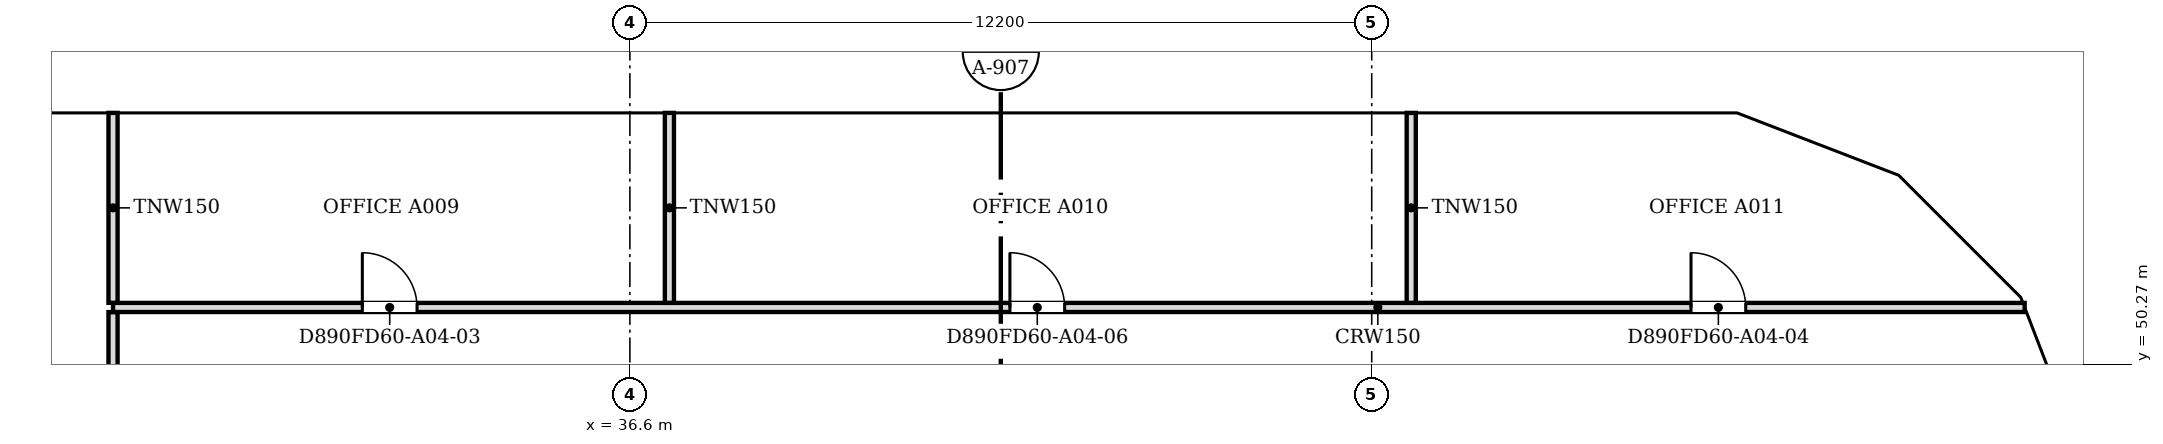
"""IFC4 building model, lengths in metres.
Left out: names, types, materials, properties, quantities, classifications, styles, units other than length and angle.
Written with IfcOpenShell. Run it as: python <this file> out.ifc"""

import sys

from ifc_helpers import new_model, si_unit, direction, frame, frame_2d, origin, place, context, subcontext, project, spatial, polyline, rectangle, outline, extrude, faceted_brep, source, transform, mapped, element, fill, save


model = new_model("IFC4")
c1 = context("Model", 3, precision=1e-05, world=origin(), true_north=direction((0.0, 1.0)))
c2 = subcontext(c1, "Body", "Model", "MODEL_VIEW")
j1 = project(units=[si_unit("LENGTHUNIT", "METRE"), si_unit("PLANEANGLEUNIT", "RADIAN")], contexts=[c1])
p1 = place(None, origin())
s1 = spatial("IfcSite", under=j1, at=p1, CompositionType="ELEMENT")
p2 = place(p1, origin())
s2 = spatial("IfcBuilding", under=s1, at=p2, CompositionType="ELEMENT")
p3 = place(p2, frame((0.0, 0.0, 48.6)))
s3 = spatial("IfcBuildingStorey", under=s2, at=p3, CompositionType="ELEMENT", Elevation=48.6)
m1 = source(origin(), c2, "Body", "Brep", [
    faceted_brep([(2.95, -0.25, 0.0), (3.003, -0.25, 0.068), (3.003, -0.25, 7.531), (2.95, -0.25, 7.6), (0.0, -0.25, 3.8), (0.047, 0.25, 3.86), (2.898, 0.25, 7.532), (2.898, 0.25, 0.068), (0.047, 0.25, 3.74), (2.95, 0.0, 0.0), (2.95, 0.0, 7.6), (0.0, 0.0, 3.8)], [[[0, 1, 2, 3, 4]], [[5, 6, 7, 8]], [[1, 0, 9]], [[10, 3, 2]], [[6, 5, 11, 4, 3, 10]], [[8, 7, 9, 0, 4, 11]], [[8, 11, 5]], [[1, 9, 7, 6, 10, 2]]]),
])
p4 = place(p3, frame((60.75, 48.753, -3.8), z_axis=(0.0, 0.0, 1.0), x_axis=(-0.35992665181, 0.932980602862, 0.0)))
e1 = element("IfcWall", 1, at=p4, inside=s3, PredefinedType="SOLIDWALL", context=c2, shape_type="MappedRepresentation", body=[
    mapped(m1, transform((0.0, 0.0, 0.0), scale=1.0)),
])
m2 = source(origin(), c2, "Body", "SweptSolid", [
    extrude(outline(polyline([(2.75, 6.935), (0.316, 3.8), (2.75, 0.665), (2.75, 6.935)])), frame((0.0, 0.26, 0.0), z_axis=(0.0, -1.0, 0.0), x_axis=(1.0, 0.0, 0.0)), (0.0, 0.0, 1.0), 0.52),
])
p5 = place(p4, origin())
e2 = element("IfcOpeningElement", 2, at=p5, cuts=e1, PredefinedType="OPENING", context=c2, shape_type="MappedRepresentation", body=[
    mapped(m2, transform((0.0, 0.0, 0.0), scale=1.0)),
])
m3 = source(origin(), c2, "Body", "Brep", [
    faceted_brep([(0.053, -0.25, 0.0), (2.997, -0.25, 3.8), (0.053, -0.25, 7.6), (0.0, -0.25, 7.532), (0.0, -0.25, 0.068), (0.106, 0.25, 7.531), (2.944, 0.25, 3.868), (2.944, 0.25, 3.732), (0.106, 0.25, 0.068), (2.997, 0.0, 3.8), (0.053, 0.0, 0.0), (0.053, 0.0, 7.6)], [[[0, 1, 2, 3, 4]], [[5, 6, 7, 8]], [[8, 7, 9, 1, 0, 10]], [[6, 5, 11, 2, 1, 9]], [[3, 2, 11]], [[10, 0, 4]], [[8, 10, 4, 3, 11, 5]], [[7, 6, 9]]]),
])
p6 = place(p3, frame((59.726, 51.469, -3.8), z_axis=(0.0, 0.0, 1.0), x_axis=(-0.707106781187, 0.707106781187, 0.0)))
e3 = element("IfcWall", 3, at=p6, inside=s3, PredefinedType="SOLIDWALL", context=c2, shape_type="MappedRepresentation", body=[
    mapped(m3, transform((0.0, 0.0, 0.0), scale=1.0)),
])
m4 = source(origin(), c2, "Body", "SweptSolid", [
    extrude(outline(polyline([(0.253, 0.666), (2.681, 3.8), (0.253, 6.934), (0.253, 0.666)])), frame((0.0, 0.26, 0.0), z_axis=(0.0, -1.0, 0.0), x_axis=(1.0, 0.0, 0.0)), (0.0, 0.0, 1.0), 0.52),
])
p7 = place(p6, origin())
e4 = element("IfcOpeningElement", 4, at=p7, cuts=e3, PredefinedType="OPENING", context=c2, shape_type="MappedRepresentation", body=[
    mapped(m4, transform((0.0, 0.0, 0.0), scale=1.0)),
])
m5 = source(origin(), c2, "Body", "Brep", [
    faceted_brep([(2.95, -0.25, 0.0), (2.997, -0.25, 0.059), (2.997, -0.25, 7.541), (2.95, -0.25, 7.6), (0.0, -0.25, 3.8), (0.053, 0.25, 3.868), (2.904, 0.25, 7.54), (2.904, 0.25, 0.06), (0.053, 0.25, 3.732), (2.95, 0.0, 0.0), (2.95, 0.0, 7.6), (0.0, 0.0, 3.8)], [[[0, 1, 2, 3, 4]], [[5, 6, 7, 8]], [[1, 0, 9]], [[10, 3, 2]], [[6, 5, 11, 4, 3, 10]], [[8, 7, 9, 0, 4, 11]], [[8, 11, 5]], [[1, 9, 7, 6, 10, 2]]]),
])
p8 = place(p3, frame((57.606, 53.588, -3.8), z_axis=(0.0, 0.0, 1.0), x_axis=(-0.932990326376, 0.359901446078, 0.0)))
e5 = element("IfcWall", 5, at=p8, inside=s3, PredefinedType="SOLIDWALL", context=c2, shape_type="MappedRepresentation", body=[
    mapped(m5, transform((0.0, 0.0, 0.0), scale=1.0)),
])
p9 = place(p8, origin())
e6 = element("IfcOpeningElement", 6, at=p9, cuts=e5, PredefinedType="OPENING", context=c2, shape_type="MappedRepresentation", body=[
    mapped(m2, transform((0.0, 0.0, 0.0), scale=1.0)),
])
m6 = source(origin(), c2, "Body", "Brep", [
    faceted_brep([(0.047, -0.25, 0.0), (3.05, -0.25, 3.8), (0.047, -0.25, 7.6), (0.0, -0.25, 7.54), (0.0, -0.25, 0.06), (0.093, 0.25, 7.541), (3.05, 0.25, 3.8), (0.093, 0.25, 0.059), (0.047, 0.0, 0.0), (0.047, 0.0, 7.6)], [[[0, 1, 2, 3, 4]], [[5, 6, 7]], [[7, 6, 1, 0, 8]], [[6, 5, 9, 2, 1]], [[3, 2, 9]], [[8, 0, 4]], [[7, 8, 4, 3, 9, 5]]]),
])
p10 = place(p3, frame((54.9, 54.65, -3.8), z_axis=(0.0, 0.0, 1.0), x_axis=(-1.0, 0.0, 0.0)))
e7 = element("IfcWall", 7, at=p10, inside=s3, PredefinedType="SOLIDWALL", context=c2, shape_type="MappedRepresentation", body=[
    mapped(m6, transform((0.0, 0.0, 0.0), scale=1.0)),
])
m7 = source(origin(), c2, "Body", "SweptSolid", [
    extrude(outline(polyline([(0.247, 0.656), (2.731, 3.8), (0.247, 6.944), (0.247, 0.656)])), frame((0.0, 0.26, 0.0), z_axis=(0.0, -1.0, 0.0), x_axis=(1.0, 0.0, 0.0)), (0.0, 0.0, 1.0), 0.52),
])
p11 = place(p10, origin())
e8 = element("IfcOpeningElement", 8, at=p11, cuts=e7, PredefinedType="OPENING", context=c2, shape_type="MappedRepresentation", body=[
    mapped(m7, transform((0.0, 0.0, 0.0), scale=1.0)),
])
m8 = source(origin(), c2, "Body", "SweptSolid", [
    extrude(outline(polyline([(3.05, 0.0), (6.1, 3.8), (3.05, 7.6), (0.0, 3.8), (3.05, 0.0)])), frame((0.0, 0.25, 0.0), z_axis=(0.0, -1.0, 0.0), x_axis=(1.0, 0.0, 0.0)), (0.0, 0.0, 1.0), 0.5),
])
p12 = place(p3, frame((51.85, 54.65, -3.8), z_axis=(0.0, 0.0, 1.0), x_axis=(-1.0, 0.0, 0.0)))
e9 = element("IfcWall", 9, at=p12, inside=s3, PredefinedType="SOLIDWALL", context=c2, shape_type="MappedRepresentation", body=[
    mapped(m8, transform((0.0, 0.0, 0.0), scale=1.0)),
])
m9 = source(origin(), c2, "Body", "SweptSolid", [
    extrude(outline(polyline([(3.05, 0.399), (5.78, 3.8), (3.05, 7.2), (0.321, 3.8), (3.05, 0.399)])), frame((0.0, 0.26, 0.0), z_axis=(0.0, -1.0, 0.0), x_axis=(1.0, 0.0, 0.0)), (0.0, 0.0, 1.0), 0.52),
])
p13 = place(p12, origin())
e10 = element("IfcOpeningElement", 10, at=p13, cuts=e9, PredefinedType="OPENING", context=c2, shape_type="MappedRepresentation", body=[
    mapped(m9, transform((0.0, 0.0, 0.0), scale=1.0)),
])
p14 = place(p3, frame((45.75, 54.65, -3.8), z_axis=(0.0, 0.0, 1.0), x_axis=(-1.0, 0.0, 0.0)))
e11 = element("IfcWall", 11, at=p14, inside=s3, PredefinedType="SOLIDWALL", context=c2, shape_type="MappedRepresentation", body=[
    mapped(m8, transform((0.0, 0.0, 0.0), scale=1.0)),
])
p15 = place(p14, origin())
e12 = element("IfcOpeningElement", 12, at=p15, cuts=e11, PredefinedType="OPENING", context=c2, shape_type="MappedRepresentation", body=[
    mapped(m9, transform((0.0, 0.0, 0.0), scale=1.0)),
])
m10 = source(origin(), c2, "Body", "Brep", [
    faceted_brep([(3.05, -0.25, 0.0), (6.1, -0.25, 3.8), (6.1, -0.25, 3.8), (3.05, -0.25, 7.6), (0.0, -0.25, 3.8), (0.0, 0.25, 3.8), (3.05, 0.25, 7.6), (6.1, 0.25, 3.8), (6.1, 0.25, 3.8), (3.05, 0.25, 0.0)], [[[0, 1, 2, 3, 4]], [[5, 6, 7, 8, 9]], [[9, 8, 1, 0]], [[7, 6, 3, 2]], [[6, 5, 4, 3]], [[5, 9, 0, 4]], [[1, 8, 7, 2]]]),
])
p16 = place(p3, frame((39.65, 54.65, -3.8), z_axis=(0.0, 0.0, 1.0), x_axis=(-1.0, 0.0, 0.0)))
e13 = element("IfcWall", 13, at=p16, inside=s3, PredefinedType="SOLIDWALL", context=c2, shape_type="MappedRepresentation", body=[
    mapped(m10, transform((0.0, 0.0, 0.0), scale=1.0)),
])
p17 = place(p16, origin())
e14 = element("IfcOpeningElement", 14, at=p17, cuts=e13, PredefinedType="OPENING", context=c2, shape_type="MappedRepresentation", body=[
    mapped(m9, transform((0.0, 0.0, 0.0), scale=1.0)),
])
p18 = place(p3, frame((33.55, 54.65, -3.8), z_axis=(0.0, 0.0, 1.0), x_axis=(-1.0, 0.0, 0.0)))
e15 = element("IfcWall", 15, at=p18, inside=s3, PredefinedType="SOLIDWALL", context=c2, shape_type="MappedRepresentation", body=[
    mapped(m8, transform((0.0, 0.0, 0.0), scale=1.0)),
])
p19 = place(p18, origin())
e16 = element("IfcOpeningElement", 16, at=p19, cuts=e15, PredefinedType="OPENING", context=c2, shape_type="MappedRepresentation", body=[
    mapped(m9, transform((0.0, 0.0, 0.0), scale=1.0)),
])
p20 = place(p3, frame((27.45, 54.65, -3.8), z_axis=(0.0, 0.0, 1.0), x_axis=(-1.0, 0.0, 0.0)))
e17 = element("IfcWall", 17, at=p20, inside=s3, PredefinedType="SOLIDWALL", context=c2, shape_type="MappedRepresentation", body=[
    mapped(m10, transform((0.0, 0.0, 0.0), scale=1.0)),
])
p21 = place(p20, origin())
e18 = element("IfcOpeningElement", 18, at=p21, cuts=e17, PredefinedType="OPENING", context=c2, shape_type="MappedRepresentation", body=[
    mapped(m9, transform((0.0, 0.0, 0.0), scale=1.0)),
])
p22 = place(p2, frame((0.0, 0.0, 52.4)))
s4 = spatial("IfcBuildingStorey", under=s2, at=p22, CompositionType="ELEMENT", Elevation=52.4)
m11 = source(origin(), c2, "Body", "Brep", [
    faceted_brep([(0.047, -0.25, 0.0), (2.997, -0.25, 3.8), (0.047, -0.25, 7.6), (0.0, -0.25, 7.541), (0.0, -0.25, 0.059), (0.093, 0.25, 7.54), (2.944, 0.25, 3.868), (2.944, 0.25, 3.732), (0.093, 0.25, 0.06), (2.997, 0.0, 3.8), (0.047, 0.0, 0.0), (0.047, 0.0, 7.6)], [[[0, 1, 2, 3, 4]], [[5, 6, 7, 8]], [[8, 7, 9, 1, 0, 10]], [[6, 5, 11, 2, 1, 9]], [[3, 2, 11]], [[10, 0, 4]], [[8, 10, 4, 3, 11, 5]], [[9, 7, 6]]]),
])
p23 = place(p22, frame((60.767, 48.71, -3.8), z_axis=(0.0, 0.0, 1.0), x_axis=(-0.359901446078, 0.932990326376, 0.0)))
e19 = element("IfcWall", 19, at=p23, inside=s4, PredefinedType="SOLIDWALL", context=c2, shape_type="MappedRepresentation", body=[
    mapped(m11, transform((0.0, 0.0, 0.0), scale=1.0)),
])
m12 = source(origin(), c2, "Body", "SweptSolid", [
    extrude(outline(polyline([(0.247, 0.665), (2.681, 3.8), (0.247, 6.935), (0.247, 0.665)])), frame((0.0, 0.26, 0.0), z_axis=(0.0, -1.0, 0.0), x_axis=(1.0, 0.0, 0.0)), (0.0, 0.0, 1.0), 0.52),
])
p24 = place(p23, origin())
e20 = element("IfcOpeningElement", 20, at=p24, cuts=e19, PredefinedType="OPENING", context=c2, shape_type="MappedRepresentation", body=[
    mapped(m12, transform((0.0, 0.0, 0.0), scale=1.0)),
])
m13 = source(origin(), c2, "Body", "Brep", [
    faceted_brep([(2.944, -0.25, 0.0), (2.997, -0.25, 0.068), (2.997, -0.25, 7.532), (2.944, -0.25, 7.6), (0.0, -0.25, 3.8), (0.053, 0.25, 3.868), (2.891, 0.25, 7.532), (2.891, 0.25, 0.068), (0.053, 0.25, 3.731), (2.944, 0.0, 0.0), (2.944, 0.0, 7.6), (0.0, 0.0, 3.8)], [[[0, 1, 2, 3, 4]], [[5, 6, 7, 8]], [[1, 0, 9]], [[10, 3, 2]], [[6, 5, 11, 4, 3, 10]], [[8, 7, 9, 0, 4, 11]], [[8, 11, 5]], [[1, 9, 7, 6, 10, 2]]]),
])
p25 = place(p22, frame((59.688, 51.506, -3.8), z_axis=(0.0, 0.0, 1.0), x_axis=(-0.707106781187, 0.707106781187, 0.0)))
e21 = element("IfcWall", 21, at=p25, inside=s4, PredefinedType="SOLIDWALL", context=c2, shape_type="MappedRepresentation", body=[
    mapped(m13, transform((0.0, 0.0, 0.0), scale=1.0)),
])
m14 = source(origin(), c2, "Body", "SweptSolid", [
    extrude(outline(polyline([(2.744, 6.934), (0.316, 3.8), (2.744, 0.666), (2.744, 6.934)])), frame((0.0, 0.26, 0.0), z_axis=(0.0, -1.0, 0.0), x_axis=(1.0, 0.0, 0.0)), (0.0, 0.0, 1.0), 0.52),
])
p26 = place(p25, origin())
e22 = element("IfcOpeningElement", 22, at=p26, cuts=e21, PredefinedType="OPENING", context=c2, shape_type="MappedRepresentation", body=[
    mapped(m14, transform((0.0, 0.0, 0.0), scale=1.0)),
])
m15 = source(origin(), c2, "Body", "Brep", [
    faceted_brep([(0.053, -0.25, 0.0), (3.003, -0.25, 3.8), (0.053, -0.25, 7.6), (0.0, -0.25, 7.531), (0.0, -0.25, 0.068), (0.106, 0.25, 7.532), (2.957, 0.25, 3.86), (2.957, 0.25, 3.74), (0.106, 0.25, 0.068), (3.003, 0.0, 3.8), (0.053, 0.0, 0.0), (0.053, 0.0, 7.6)], [[[0, 1, 2, 3, 4]], [[5, 6, 7, 8]], [[8, 7, 9, 1, 0, 10]], [[6, 5, 11, 2, 1, 9]], [[3, 2, 11]], [[10, 0, 4]], [[8, 10, 4, 3, 11, 5]], [[9, 7, 6]]]),
])
p27 = place(p22, frame((57.656, 53.569, -3.8), z_axis=(0.0, 0.0, 1.0), x_axis=(-0.933007896601, 0.359855894603, 0.0)))
e23 = element("IfcWall", 23, at=p27, inside=s4, PredefinedType="SOLIDWALL", context=c2, shape_type="MappedRepresentation", body=[
    mapped(m15, transform((0.0, 0.0, 0.0), scale=1.0)),
])
m16 = source(origin(), c2, "Body", "SweptSolid", [
    extrude(outline(polyline([(0.253, 0.665), (2.687, 3.8), (0.253, 6.935), (0.253, 0.665)])), frame((0.0, 0.26, 0.0), z_axis=(0.0, -1.0, 0.0), x_axis=(1.0, 0.0, 0.0)), (0.0, 0.0, 1.0), 0.52),
])
p28 = place(p27, origin())
e24 = element("IfcOpeningElement", 24, at=p28, cuts=e23, PredefinedType="OPENING", context=c2, shape_type="MappedRepresentation", body=[
    mapped(m16, transform((0.0, 0.0, 0.0), scale=1.0)),
])
m17 = source(origin(), c2, "Body", "Brep", [
    faceted_brep([(3.003, -0.25, 0.0), (6.053, -0.25, 3.8), (3.003, -0.25, 7.6), (0.0, -0.25, 3.8), (0.047, 0.25, 3.859), (3.003, 0.25, 7.6), (6.053, 0.25, 3.8), (3.003, 0.25, 0.0), (0.047, 0.25, 3.741), (0.0, 0.0, 3.8)], [[[0, 1, 2, 3]], [[4, 5, 6, 7, 8]], [[7, 6, 1, 0]], [[6, 5, 2, 1]], [[5, 4, 9, 3, 2]], [[8, 7, 0, 3, 9]], [[8, 9, 4]]]),
])
p29 = place(p22, frame((54.854, 54.65, -3.8), z_axis=(0.0, 0.0, 1.0), x_axis=(-1.0, 0.0, 0.0)))
e25 = element("IfcWall", 25, at=p29, inside=s4, PredefinedType="SOLIDWALL", context=c2, shape_type="MappedRepresentation", body=[
    mapped(m17, transform((0.0, 0.0, 0.0), scale=1.0)),
])
m18 = source(origin(), c2, "Body", "SweptSolid", [
    extrude(outline(polyline([(3.005, 0.401), (5.733, 3.8), (3.005, 7.199), (0.319, 3.8), (3.005, 0.401)])), frame((0.0, 0.26, 0.0), z_axis=(0.0, -1.0, 0.0), x_axis=(1.0, 0.0, 0.0)), (0.0, 0.0, 1.0), 0.52),
])
p30 = place(p29, origin())
e26 = element("IfcOpeningElement", 26, at=p30, cuts=e25, PredefinedType="OPENING", context=c2, shape_type="MappedRepresentation", body=[
    mapped(m18, transform((0.0, 0.0, 0.0), scale=1.0)),
])
m19 = source(origin(), c2, "Body", "SweptSolid", [
    extrude(outline(polyline([(3.05, 0.0), (6.1, 3.8), (3.05, 7.6), (0.0, 3.8), (3.05, 0.0)])), frame((0.0, 0.25, 0.0), z_axis=(0.0, -1.0, 0.0), x_axis=(1.0, 0.0, 0.0)), (0.0, 0.0, 1.0), 0.5),
])
p31 = place(p22, frame((48.8, 54.65, -3.8), z_axis=(0.0, 0.0, 1.0), x_axis=(-1.0, 0.0, 0.0)))
e27 = element("IfcWall", 27, at=p31, inside=s4, PredefinedType="SOLIDWALL", context=c2, shape_type="MappedRepresentation", body=[
    mapped(m19, transform((0.0, 0.0, 0.0), scale=1.0)),
])
m20 = source(origin(), c2, "Body", "SweptSolid", [
    extrude(outline(polyline([(3.05, 0.399), (5.78, 3.8), (3.05, 7.2), (0.321, 3.8), (3.05, 0.399)])), frame((0.0, 0.26, 0.0), z_axis=(0.0, -1.0, 0.0), x_axis=(1.0, 0.0, 0.0)), (0.0, 0.0, 1.0), 0.52),
])
p32 = place(p31, origin())
e28 = element("IfcOpeningElement", 28, at=p32, cuts=e27, PredefinedType="OPENING", context=c2, shape_type="MappedRepresentation", body=[
    mapped(m20, transform((0.0, 0.0, 0.0), scale=1.0)),
])
m21 = source(origin(), c2, "Body", "Brep", [
    faceted_brep([(3.05, -0.25, 0.0), (6.1, -0.25, 3.8), (6.1, -0.25, 3.8), (3.05, -0.25, 7.6), (0.0, -0.25, 3.8), (0.0, 0.25, 3.8), (3.05, 0.25, 7.6), (6.1, 0.25, 3.8), (6.1, 0.25, 3.8), (3.05, 0.25, 0.0)], [[[0, 1, 2, 3, 4]], [[5, 6, 7, 8, 9]], [[9, 8, 1, 0]], [[7, 6, 3, 2]], [[6, 5, 4, 3]], [[5, 9, 0, 4]], [[1, 8, 7, 2]]]),
])
p33 = place(p22, frame((42.7, 54.65, -3.8), z_axis=(0.0, 0.0, 1.0), x_axis=(-1.0, 0.0, 0.0)))
e29 = element("IfcWall", 29, at=p33, inside=s4, PredefinedType="SOLIDWALL", context=c2, shape_type="MappedRepresentation", body=[
    mapped(m21, transform((0.0, 0.0, 0.0), scale=1.0)),
])
p34 = place(p33, origin())
e30 = element("IfcOpeningElement", 30, at=p34, cuts=e29, PredefinedType="OPENING", context=c2, shape_type="MappedRepresentation", body=[
    mapped(m20, transform((0.0, 0.0, 0.0), scale=1.0)),
])
p35 = place(p22, frame((36.6, 54.65, -3.8), z_axis=(0.0, 0.0, 1.0), x_axis=(-1.0, 0.0, 0.0)))
e31 = element("IfcWall", 31, at=p35, inside=s4, PredefinedType="SOLIDWALL", context=c2, shape_type="MappedRepresentation", body=[
    mapped(m19, transform((0.0, 0.0, 0.0), scale=1.0)),
])
p36 = place(p35, origin())
e32 = element("IfcOpeningElement", 32, at=p36, cuts=e31, PredefinedType="OPENING", context=c2, shape_type="MappedRepresentation", body=[
    mapped(m20, transform((0.0, 0.0, 0.0), scale=1.0)),
])
p37 = place(p22, frame((30.5, 54.65, -3.8), z_axis=(0.0, 0.0, 1.0), x_axis=(-1.0, 0.0, 0.0)))
e33 = element("IfcWall", 33, at=p37, inside=s4, PredefinedType="SOLIDWALL", context=c2, shape_type="MappedRepresentation", body=[
    mapped(m19, transform((0.0, 0.0, 0.0), scale=1.0)),
])
p38 = place(p37, origin())
e34 = element("IfcOpeningElement", 34, at=p38, cuts=e33, PredefinedType="OPENING", context=c2, shape_type="MappedRepresentation", body=[
    mapped(m20, transform((0.0, 0.0, 0.0), scale=1.0)),
])
p39 = place(p3, frame((28.1, 47.376, 0.0), z_axis=(0.0, 0.0, 1.0), x_axis=(0.0, 1.0, 0.0)))
e35 = element("IfcWall", 35, at=p39, inside=s3, PredefinedType="PARTITIONING", context=c2, shape_type="SweptSolid", body=[
    extrude(rectangle(XDim=3.748, YDim=0.15, at=frame_2d((1.874, 0.0))), origin(), (0.0, 0.0, 1.0), 3.067),
])
p40 = place(p3, frame((28.1, 51.2, 0.0), z_axis=(0.0, 0.0, 1.0), x_axis=(1.0, 0.0, 0.0)))
e36 = element("IfcWall", 36, at=p40, inside=s3, PredefinedType="PARTITIONING", context=c2, shape_type="SweptSolid", body=[
    extrude(rectangle(XDim=31.438, YDim=0.15, at=frame_2d((15.719, 0.0))), origin(), (0.0, 0.0, 1.0), 3.067),
])
m22 = source(origin(), c2, "Body", "SweptSolid", [
    extrude(rectangle(XDim=0.9, YDim=2.1, at=frame_2d((0.45, 1.05))), frame((0.0, 0.085, 0.0), z_axis=(0.0, -1.0, 0.0), x_axis=(1.0, 0.0, 0.0)), (0.0, 0.0, 1.0), 0.17),
])
p41 = place(p40, frame((4.1, 0.0, 0.0)))
e37 = element("IfcOpeningElement", 37, at=p41, cuts=e36, PredefinedType="OPENING", context=c2, shape_type="MappedRepresentation", body=[
    mapped(m22, transform((0.0, 0.0, 0.0), scale=1.0)),
])
p42 = place(p40, frame((25.951, 0.0, 0.0)))
e38 = element("IfcOpeningElement", 38, at=p42, cuts=e36, PredefinedType="OPENING", context=c2, shape_type="MappedRepresentation", body=[
    mapped(m22, transform((0.0, 0.0, 0.0), scale=1.0)),
])
p43 = place(p40, frame((14.75, 0.0, 0.0)))
e39 = element("IfcOpeningElement", 39, at=p43, cuts=e36, PredefinedType="OPENING", context=c2, shape_type="MappedRepresentation", body=[
    mapped(m22, transform((0.0, 0.0, 0.0), scale=1.0)),
])
for number, where, z_axis, x_axis in (
    (40, (28.1, 51.276, 0.0), (0.0, 0.0, 1.0), (0.0, 1.0, 0.0)),
    (41, (37.25, 51.276, 0.0), (0.0, 0.0, 1.0), (0.0, 1.0, 0.0)),
    (42, (49.45, 51.276, 0.0), (0.0, 0.0, 1.0), (0.0, 1.0, 0.0)),
):
    element("IfcWall", number, at=place(p3, frame(where, z_axis=z_axis, x_axis=x_axis)), inside=s3, PredefinedType="PARTITIONING", context=c2, shape_type="SweptSolid", body=[
        extrude(rectangle(XDim=3.124, YDim=0.15, at=frame_2d((1.562, 0.0))), origin(), (0.0, 0.0, 1.0), 3.067),
    ])
m23 = source(origin(), c2, "Body", "SweptSolid", [
    extrude(rectangle(XDim=0.9, YDim=2.1, at=frame_2d((0.45, 1.05))), frame((0.0, 0.025, 0.0), z_axis=(0.0, -1.0, 0.0), x_axis=(1.0, 0.0, 0.0)), (0.0, 0.0, 1.0), 0.05),
])
p44 = place(p41, origin())
e43 = element("IfcDoor", 43, at=p44, inside=s3, OperationType="SINGLE_SWING_LEFT", PredefinedType="DOOR", context=c2, shape_type="MappedRepresentation", body=[
    mapped(m23, transform((0.0, 0.0, 0.0), scale=1.0)),
])
fill(e37, e43)
p45 = place(p42, origin())
e44 = element("IfcDoor", 44, at=p45, inside=s3, OperationType="SINGLE_SWING_LEFT", PredefinedType="DOOR", context=c2, shape_type="MappedRepresentation", body=[
    mapped(m23, transform((0.0, 0.0, 0.0), scale=1.0)),
])
fill(e38, e44)
p46 = place(p43, origin())
e45 = element("IfcDoor", 45, at=p46, inside=s3, OperationType="SINGLE_SWING_LEFT", PredefinedType="DOOR", context=c2, shape_type="MappedRepresentation", body=[
    mapped(m23, transform((0.0, 0.0, 0.0), scale=1.0)),
])
fill(e39, e45)
save(model, sys.argv[1])
